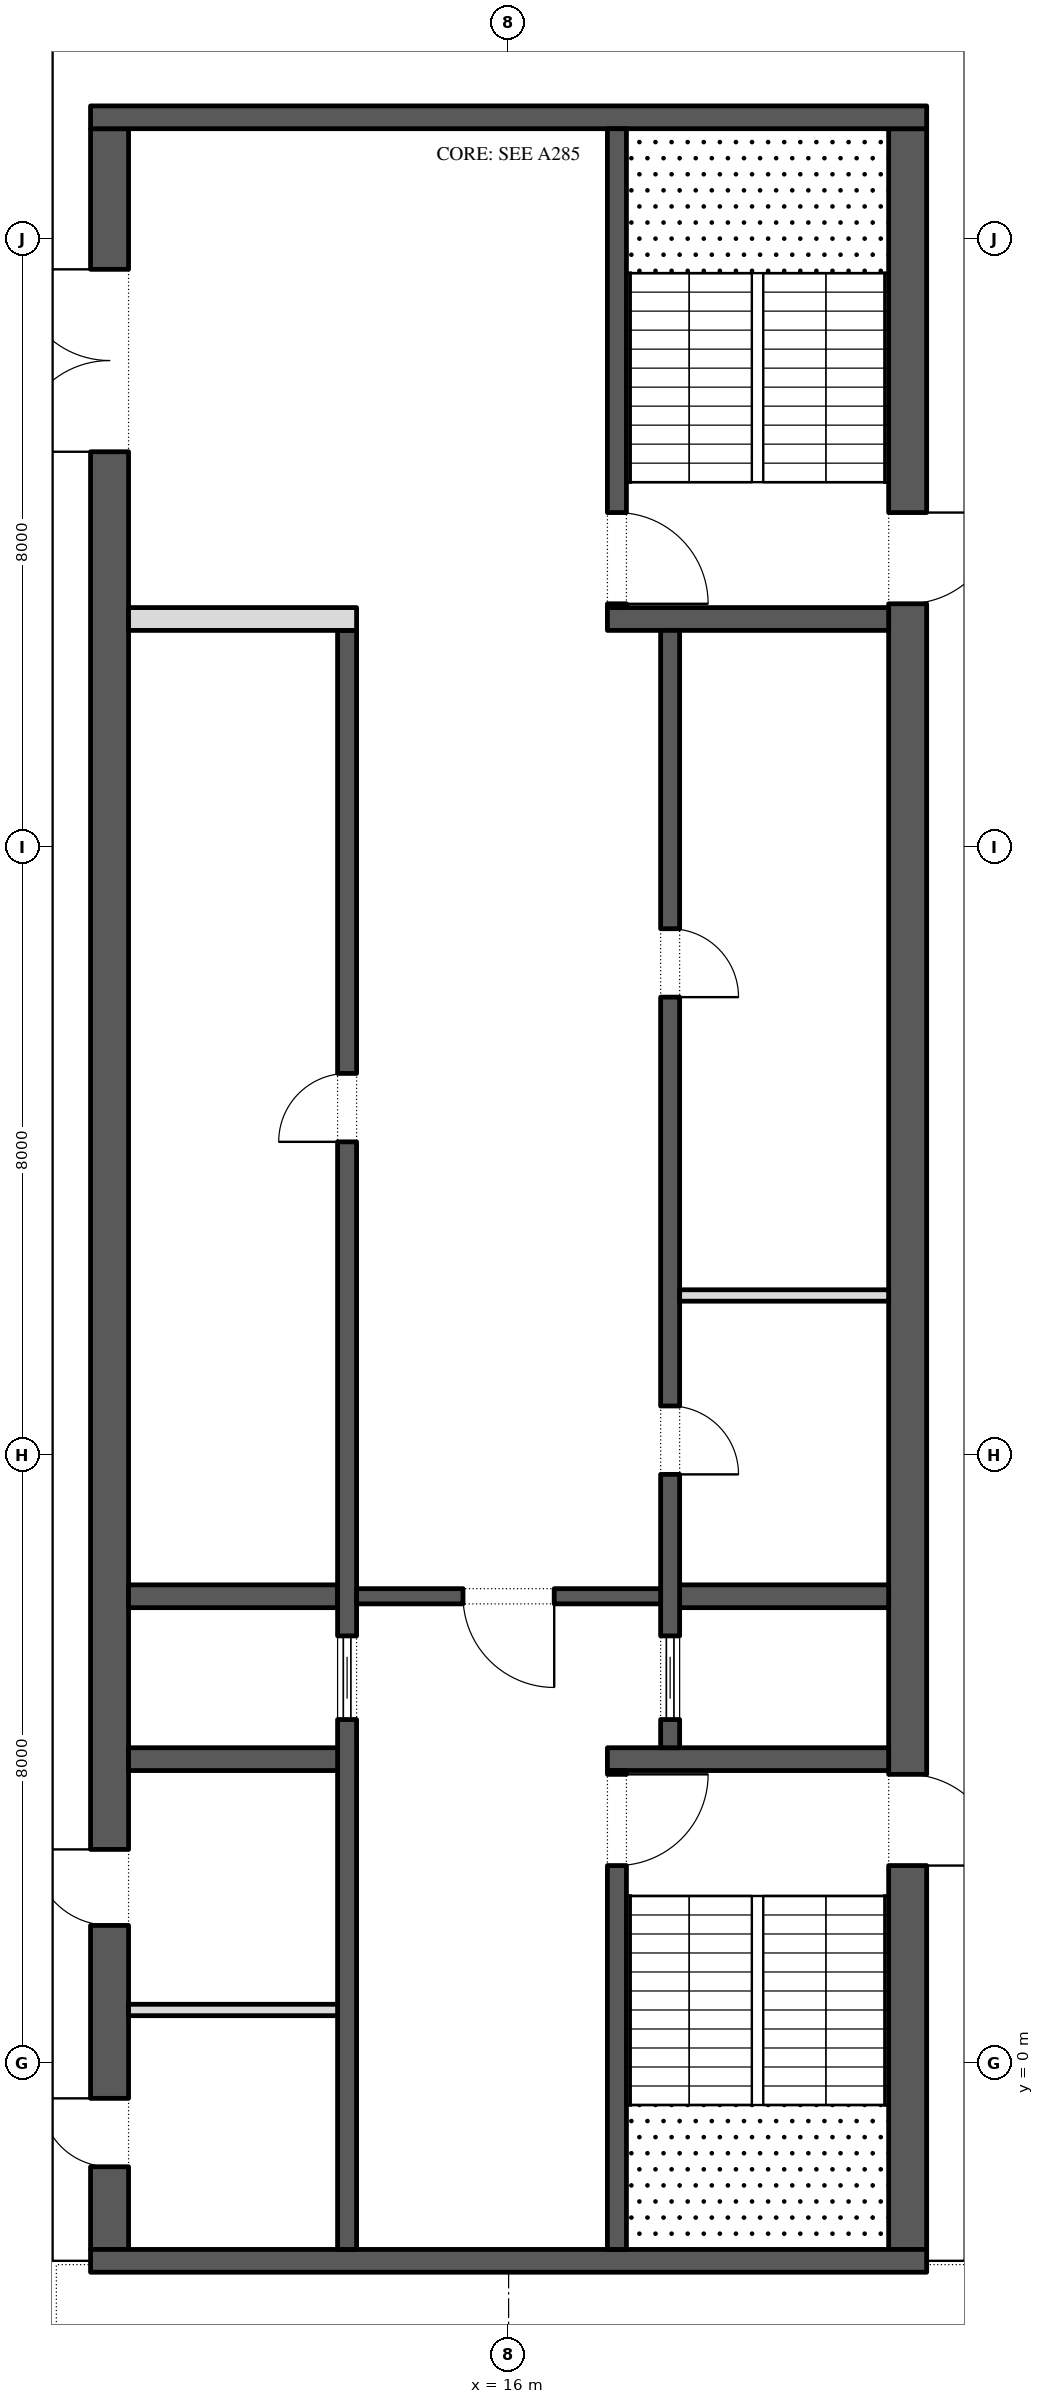
"""IFC4 building model, lengths in metres.
Left out: names, types, materials, properties, quantities, classifications, styles, units other than length and angle.
Written with IfcOpenShell. Run it as: python <this file> out.ifc"""

import sys

from ifc_helpers import new_model, si_unit, direction, frame, frame_2d, origin, place, context, subcontext, project, spatial, rectangle, extrude, element, fill, save


model = new_model("IFC4")
c1 = context("Model", 3, precision=1e-05, world=origin(), true_north=direction((0.0, 1.0)))
c2 = subcontext(c1, "Body", "Model", "MODEL_VIEW")
j1 = project(units=[si_unit("LENGTHUNIT", "METRE"), si_unit("PLANEANGLEUNIT", "RADIAN")], contexts=[c1])
p1 = place(None, origin())
s1 = spatial("IfcSite", under=j1, at=p1, CompositionType="ELEMENT")
p2 = place(p1, origin())
s2 = spatial("IfcBuilding", under=s1, at=p2, CompositionType="ELEMENT")
p3 = place(p2, frame((0.0, 0.0, 373.2)))
s3 = spatial("IfcBuildingStorey", under=s2, at=p3, CompositionType="ELEMENT", Elevation=373.2)
p4 = place(p3, frame((21.25, -2.45, 0.0), z_axis=(0.0, 0.0, 1.0), x_axis=(0.0, 1.0, 0.0)))
e1 = element("IfcWall", 1, at=p4, inside=s3, PredefinedType="SHEAR", context=c2, shape_type="SweptSolid", body=[
    extrude(rectangle(XDim=27.9, YDim=0.5, at=frame_2d((13.95, 0.0))), origin(), (0.0, 0.0, 1.0), 4.0),
])
p5 = place(p4, frame((5.05, 0.0, 0.0)))
e2 = element("IfcOpeningElement", 2, at=p5, cuts=e1, PredefinedType="OPENING", context=c2, shape_type="SweptSolid", body=[
    extrude(rectangle(XDim=1.2, YDim=2.1, at=frame_2d((0.6, 1.05))), frame((0.0, 0.26, 0.0), z_axis=(0.0, -1.0, 0.0), x_axis=(1.0, 0.0, 0.0)), (0.0, 0.0, 1.0), 0.52),
])
p6 = place(p4, frame((21.65, 0.0, 0.0)))
e3 = element("IfcOpeningElement", 3, at=p6, cuts=e1, PredefinedType="OPENING", context=c2, shape_type="SweptSolid", body=[
    extrude(rectangle(XDim=1.2, YDim=2.1, at=frame_2d((0.6, 1.05))), frame((0.0, 0.26, 0.0), z_axis=(0.0, -1.0, 0.0), x_axis=(1.0, 0.0, 0.0)), (0.0, 0.0, 1.0), 0.52),
])
p7 = place(p3, frame((10.75, -2.45, 0.0), z_axis=(0.0, 0.0, 1.0), x_axis=(0.0, 1.0, 0.0)))
e4 = element("IfcWall", 4, at=p7, inside=s3, PredefinedType="SHEAR", context=c2, shape_type="SweptSolid", body=[
    extrude(rectangle(XDim=27.9, YDim=0.5, at=frame_2d((13.95, 0.0))), origin(), (0.0, 0.0, 1.0), 4.0),
])
p8 = place(p7, frame((23.65, 0.0, 0.0)))
e5 = element("IfcOpeningElement", 5, at=p8, cuts=e4, PredefinedType="OPENING", context=c2, shape_type="SweptSolid", body=[
    extrude(rectangle(XDim=2.4, YDim=2.1, at=frame_2d((1.2, 1.05))), frame((0.0, 0.26, 0.0), z_axis=(0.0, -1.0, 0.0), x_axis=(1.0, 0.0, 0.0)), (0.0, 0.0, 1.0), 0.52),
])
p9 = place(p7, frame((1.087, 0.0, 0.0)))
e6 = element("IfcOpeningElement", 6, at=p9, cuts=e4, PredefinedType="OPENING", context=c2, shape_type="SweptSolid", body=[
    extrude(rectangle(XDim=0.9, YDim=2.1, at=frame_2d((0.45, 1.05))), frame((0.0, 0.26, 0.0), z_axis=(0.0, -1.0, 0.0), x_axis=(1.0, 0.0, 0.0)), (0.0, 0.0, 1.0), 0.52),
])
p10 = place(p7, frame((4.262, 0.0, 0.0)))
e7 = element("IfcOpeningElement", 7, at=p10, cuts=e4, PredefinedType="OPENING", context=c2, shape_type="SweptSolid", body=[
    extrude(rectangle(XDim=1.0, YDim=2.1, at=frame_2d((0.5, 1.05))), frame((0.0, 0.26, 0.0), z_axis=(0.0, -1.0, 0.0), x_axis=(1.0, 0.0, 0.0)), (0.0, 0.0, 1.0), 0.52),
])
for number, where, z_axis, x_axis in (
    (8, (10.5, -2.6, 0.0), (0.0, 0.0, 1.0), (1.0, 0.0, 0.0)),
    (9, (10.5, 25.6, 0.0), (0.0, 0.0, 1.0), (1.0, 0.0, 0.0)),
):
    element("IfcWall", number, at=place(p3, frame(where, z_axis=z_axis, x_axis=x_axis)), inside=s3, PredefinedType="SHEAR", context=c2, shape_type="SweptSolid", body=[
        extrude(rectangle(XDim=11.0, YDim=0.3, at=frame_2d((5.5, 0.0))), origin(), (0.0, 0.0, 1.0), 4.0),
    ])
p11 = place(p3, frame((17.3, 4.0, 0.0), z_axis=(0.0, 0.0, 1.0), x_axis=(1.0, 0.0, 0.0)))
e10 = element("IfcWall", 10, at=p11, inside=s3, PredefinedType="SHEAR", context=c2, shape_type="SweptSolid", body=[
    extrude(rectangle(XDim=3.7, YDim=0.3, at=frame_2d((1.85, 0.0))), origin(), (0.0, 0.0, 1.0), 4.0),
])
p12 = place(p3, frame((17.425, -2.45, 0.0), z_axis=(0.0, 0.0, 1.0), x_axis=(0.0, 1.0, 0.0)))
e11 = element("IfcWall", 11, at=p12, inside=s3, PredefinedType="SHEAR", context=c2, shape_type="SweptSolid", body=[
    extrude(rectangle(XDim=6.3, YDim=0.25, at=frame_2d((3.15, 0.0))), origin(), (0.0, 0.0, 1.0), 4.0),
])
p13 = place(p12, frame((5.05, 0.0, 0.0)))
e12 = element("IfcOpeningElement", 12, at=p13, cuts=e11, PredefinedType="OPENING", context=c2, shape_type="SweptSolid", body=[
    extrude(rectangle(XDim=1.2, YDim=2.1, at=frame_2d((0.6, 1.05))), frame((0.0, 0.135, 0.0), z_axis=(0.0, -1.0, 0.0), x_axis=(1.0, 0.0, 0.0)), (0.0, 0.0, 1.0), 0.27),
])
p14 = place(p3, frame((17.3, 19.0, 0.0), z_axis=(0.0, 0.0, 1.0), x_axis=(1.0, 0.0, 0.0)))
e13 = element("IfcWall", 13, at=p14, inside=s3, PredefinedType="SHEAR", context=c2, shape_type="SweptSolid", body=[
    extrude(rectangle(XDim=3.7, YDim=0.3, at=frame_2d((1.85, 0.0))), origin(), (0.0, 0.0, 1.0), 4.0),
])
p15 = place(p3, frame((17.425, 19.15, 0.0), z_axis=(0.0, 0.0, 1.0), x_axis=(0.0, 1.0, 0.0)))
e14 = element("IfcWall", 14, at=p15, inside=s3, PredefinedType="SHEAR", context=c2, shape_type="SweptSolid", body=[
    extrude(rectangle(XDim=6.3, YDim=0.25, at=frame_2d((3.15, 0.0))), origin(), (0.0, 0.0, 1.0), 4.0),
])
p16 = place(p15, frame((0.05, 0.0, 0.0)))
e15 = element("IfcOpeningElement", 15, at=p16, cuts=e14, PredefinedType="OPENING", context=c2, shape_type="SweptSolid", body=[
    extrude(rectangle(XDim=1.2, YDim=2.1, at=frame_2d((0.6, 1.05))), frame((0.0, 0.135, 0.0), z_axis=(0.0, -1.0, 0.0), x_axis=(1.0, 0.0, 0.0)), (0.0, 0.0, 1.0), 0.27),
])
p17 = place(p3, frame((18.25, 6.143, 0.0), z_axis=(0.0, 0.0, 1.0), x_axis=(1.0, 0.0, 0.0)))
e16 = element("IfcWall", 16, at=p17, inside=s3, PredefinedType="SHEAR", context=c2, shape_type="SweptSolid", body=[
    extrude(rectangle(XDim=2.75, YDim=0.3, at=frame_2d((1.375, 0.0))), origin(), (0.0, 0.0, 1.0), 4.0),
])
p18 = place(p3, frame((18.125, 4.15, 0.0), z_axis=(0.0, 0.0, 1.0), x_axis=(0.0, 1.0, 0.0)))
e17 = element("IfcWall", 17, at=p18, inside=s3, PredefinedType="SHEAR", context=c2, shape_type="SweptSolid", body=[
    extrude(rectangle(XDim=14.7, YDim=0.25, at=frame_2d((7.35, 0.0))), origin(), (0.0, 0.0, 1.0), 4.0),
])
p19 = place(p18, frame((3.596, 0.0, 0.0)))
e18 = element("IfcOpeningElement", 18, at=p19, cuts=e17, PredefinedType="OPENING", context=c2, shape_type="SweptSolid", body=[
    extrude(rectangle(XDim=0.9, YDim=2.1, at=frame_2d((0.45, 1.05))), frame((0.0, 0.135, 0.0), z_axis=(0.0, -1.0, 0.0), x_axis=(1.0, 0.0, 0.0)), (0.0, 0.0, 1.0), 0.27),
])
p20 = place(p18, frame((9.875, 0.0, 0.0)))
e19 = element("IfcOpeningElement", 19, at=p20, cuts=e17, PredefinedType="OPENING", context=c2, shape_type="SweptSolid", body=[
    extrude(rectangle(XDim=0.9, YDim=2.1, at=frame_2d((0.45, 1.05))), frame((0.0, 0.135, 0.0), z_axis=(0.0, -1.0, 0.0), x_axis=(1.0, 0.0, 0.0)), (0.0, 0.0, 1.0), 0.27),
])
p21 = place(p18, frame((0.371, 0.0, 0.0)))
e20 = element("IfcOpeningElement", 20, at=p21, cuts=e17, PredefinedType="OPENING", context=c2, shape_type="SweptSolid", body=[
    extrude(rectangle(XDim=1.1, YDim=2.1, at=frame_2d((0.55, 1.05))), frame((0.0, 0.135, 0.0), z_axis=(0.0, -1.0, 0.0), x_axis=(1.0, 0.0, 0.0)), (0.0, 0.0, 1.0), 0.27),
])
p22 = place(p3, frame((18.25, 10.1, 0.0), z_axis=(0.0, 0.0, 1.0), x_axis=(1.0, 0.0, 0.0)))
e21 = element("IfcWall", 21, at=p22, inside=s3, PredefinedType="PARTITIONING", context=c2, shape_type="SweptSolid", body=[
    extrude(rectangle(XDim=2.75, YDim=0.15, at=frame_2d((1.375, 0.0))), origin(), (0.0, 0.0, 1.0), 4.0),
])
p23 = place(p3, frame((11.0, 4.0, 0.0), z_axis=(0.0, 0.0, 1.0), x_axis=(1.0, 0.0, 0.0)))
e22 = element("IfcWall", 22, at=p23, inside=s3, PredefinedType="SHEAR", context=c2, shape_type="SweptSolid", body=[
    extrude(rectangle(XDim=3.0, YDim=0.3, at=frame_2d((1.5, 0.0))), origin(), (0.0, 0.0, 1.0), 4.0),
])
p24 = place(p3, frame((11.0, 6.143, 0.0), z_axis=(0.0, 0.0, 1.0), x_axis=(1.0, 0.0, 0.0)))
e23 = element("IfcWall", 23, at=p24, inside=s3, PredefinedType="SHEAR", context=c2, shape_type="SweptSolid", body=[
    extrude(rectangle(XDim=2.75, YDim=0.3, at=frame_2d((1.375, 0.0))), origin(), (0.0, 0.0, 1.0), 4.0),
])
p25 = place(p3, frame((13.875, -2.45, 0.0), z_axis=(0.0, 0.0, 1.0), x_axis=(0.0, 1.0, 0.0)))
e24 = element("IfcWall", 24, at=p25, inside=s3, PredefinedType="SHEAR", context=c2, shape_type="SweptSolid", body=[
    extrude(rectangle(XDim=21.3, YDim=0.25, at=frame_2d((10.65, 0.0))), origin(), (0.0, 0.0, 1.0), 4.0),
])
p26 = place(p25, frame((14.571, 0.0, 0.0)))
e25 = element("IfcOpeningElement", 25, at=p26, cuts=e24, PredefinedType="OPENING", context=c2, shape_type="SweptSolid", body=[
    extrude(rectangle(XDim=0.9, YDim=2.1, at=frame_2d((0.45, 1.05))), frame((0.0, 0.135, 0.0), z_axis=(0.0, -1.0, 0.0), x_axis=(1.0, 0.0, 0.0)), (0.0, 0.0, 1.0), 0.27),
])
p27 = place(p25, frame((6.971, 0.0, 0.0)))
e26 = element("IfcOpeningElement", 26, at=p27, cuts=e24, PredefinedType="OPENING", context=c2, shape_type="SweptSolid", body=[
    extrude(rectangle(XDim=1.1, YDim=2.1, at=frame_2d((0.55, 1.05))), frame((0.0, 0.135, 0.0), z_axis=(0.0, -1.0, 0.0), x_axis=(1.0, 0.0, 0.0)), (0.0, 0.0, 1.0), 0.27),
])
p28 = place(p3, frame((11.0, 19.0, 0.0), z_axis=(0.0, 0.0, 1.0), x_axis=(1.0, 0.0, 0.0)))
e27 = element("IfcWall", 27, at=p28, inside=s3, PredefinedType="PARTITIONING", context=c2, shape_type="SweptSolid", body=[
    extrude(rectangle(XDim=3.0, YDim=0.3, at=frame_2d((1.5, 0.0))), origin(), (0.0, 0.0, 1.0), 4.0),
])
p29 = place(p3, frame((14.0, 6.143, 0.0), z_axis=(0.0, 0.0, 1.0), x_axis=(1.0, 0.0, 0.0)))
e28 = element("IfcWall", 28, at=p29, inside=s3, PredefinedType="SHEAR", context=c2, shape_type="SweptSolid", body=[
    extrude(rectangle(XDim=4.0, YDim=0.2, at=frame_2d((2.0, 0.0))), origin(), (0.0, 0.0, 1.0), 4.0),
])
p30 = place(p29, frame((1.4, 0.0, 0.0)))
e29 = element("IfcOpeningElement", 29, at=p30, cuts=e28, PredefinedType="OPENING", context=c2, shape_type="SweptSolid", body=[
    extrude(rectangle(XDim=1.2, YDim=2.1, at=frame_2d((0.6, 1.05))), frame((0.0, 0.11, 0.0), z_axis=(0.0, -1.0, 0.0), x_axis=(1.0, 0.0, 0.0)), (0.0, 0.0, 1.0), 0.22),
])
p31 = place(p3, frame((11.0, 0.7, 0.0), z_axis=(0.0, 0.0, 1.0), x_axis=(1.0, 0.0, 0.0)))
e30 = element("IfcWall", 30, at=p31, inside=s3, PredefinedType="PARTITIONING", context=c2, shape_type="SweptSolid", body=[
    extrude(rectangle(XDim=2.75, YDim=0.15, at=frame_2d((1.375, 0.0))), origin(), (0.0, 0.0, 1.0), 4.0),
])
p32 = place(p19, frame((0.9, -0.2, 0.0), z_axis=(0.0, 0.0, 1.0), x_axis=(-1.0, 0.0, 0.0)))
e31 = element("IfcDoor", 31, at=p32, inside=s3, OperationType="SINGLE_SWING_LEFT", PredefinedType="DOOR", context=c2, shape_type="SweptSolid", body=[
    extrude(rectangle(XDim=0.9, YDim=2.1, at=frame_2d((0.45, 1.05))), frame((0.0, -0.075, 0.0), z_axis=(0.0, -1.0, 0.0), x_axis=(1.0, 0.0, 0.0)), (0.0, 0.0, 1.0), 0.05),
])
fill(e18, e31)
p33 = place(p20, frame((0.9, -0.2, 0.0), z_axis=(0.0, 0.0, 1.0), x_axis=(-1.0, 0.0, 0.0)))
e32 = element("IfcDoor", 32, at=p33, inside=s3, OperationType="SINGLE_SWING_LEFT", PredefinedType="DOOR", context=c2, shape_type="SweptSolid", body=[
    extrude(rectangle(XDim=0.9, YDim=2.1, at=frame_2d((0.45, 1.05))), frame((0.0, -0.075, 0.0), z_axis=(0.0, -1.0, 0.0), x_axis=(1.0, 0.0, 0.0)), (0.0, 0.0, 1.0), 0.05),
])
fill(e19, e32)
p34 = place(p21, origin())
e33 = element("IfcDoor", 33, at=p34, inside=s3, OperationType="SLIDING_TO_LEFT", PredefinedType="DOOR", context=c2, shape_type="SweptSolid", body=[
    extrude(rectangle(XDim=1.1, YDim=2.1, at=frame_2d((0.55, 1.05))), frame((0.0, 0.025, 0.0), z_axis=(0.0, -1.0, 0.0), x_axis=(1.0, 0.0, 0.0)), (0.0, 0.0, 1.0), 0.05),
])
fill(e20, e33)
p35 = place(p26, origin())
e34 = element("IfcDoor", 34, at=p35, inside=s3, OperationType="SINGLE_SWING_RIGHT", PredefinedType="DOOR", context=c2, shape_type="SweptSolid", body=[
    extrude(rectangle(XDim=0.9, YDim=2.1, at=frame_2d((0.45, 1.05))), frame((0.0, 0.125, 0.0), z_axis=(0.0, -1.0, 0.0), x_axis=(1.0, 0.0, 0.0)), (0.0, 0.0, 1.0), 0.05),
])
fill(e25, e34)
p36 = place(p27, origin())
e35 = element("IfcDoor", 35, at=p36, inside=s3, OperationType="SLIDING_TO_LEFT", PredefinedType="DOOR", context=c2, shape_type="SweptSolid", body=[
    extrude(rectangle(XDim=1.1, YDim=2.1, at=frame_2d((0.55, 1.05))), frame((0.0, 0.025, 0.0), z_axis=(0.0, -1.0, 0.0), x_axis=(1.0, 0.0, 0.0)), (0.0, 0.0, 1.0), 0.05),
])
fill(e26, e35)
p37 = place(p30, frame((1.2, 0.0, 0.0), z_axis=(0.0, 0.0, 1.0), x_axis=(-1.0, 0.0, 0.0)))
e36 = element("IfcDoor", 36, at=p37, inside=s3, OperationType="SINGLE_SWING_RIGHT", PredefinedType="DOOR", context=c2, shape_type="SweptSolid", body=[
    extrude(rectangle(XDim=1.2, YDim=2.1, at=frame_2d((0.6, 1.05))), frame((0.0, 0.025, 0.0), z_axis=(0.0, -1.0, 0.0), x_axis=(1.0, 0.0, 0.0)), (0.0, 0.0, 1.0), 0.05),
])
fill(e29, e36)
p38 = place(p8, origin())
e37 = element("IfcDoor", 37, at=p38, inside=s3, OperationType="DOUBLE_DOOR_SINGLE_SWING", PredefinedType="DOOR", context=c2, shape_type="SweptSolid", body=[
    extrude(rectangle(XDim=2.4, YDim=2.1, at=frame_2d((1.2, 1.05))), frame((0.0, 0.025, 0.0), z_axis=(0.0, -1.0, 0.0), x_axis=(1.0, 0.0, 0.0)), (0.0, 0.0, 1.0), 0.05),
])
fill(e5, e37)
p39 = place(p13, frame((1.2, 0.0, 0.0), z_axis=(0.0, 0.0, 1.0), x_axis=(-1.0, 0.0, 0.0)))
e38 = element("IfcDoor", 38, at=p39, inside=s3, OperationType="SINGLE_SWING_RIGHT", PredefinedType="DOOR", context=c2, shape_type="SweptSolid", body=[
    extrude(rectangle(XDim=1.2, YDim=2.1, at=frame_2d((0.6, 1.05))), frame((0.0, 0.025, 0.0), z_axis=(0.0, -1.0, 0.0), x_axis=(1.0, 0.0, 0.0)), (0.0, 0.0, 1.0), 0.05),
])
fill(e12, e38)
p40 = place(p5, frame((1.2, 0.0, 0.0), z_axis=(0.0, 0.0, 1.0), x_axis=(-1.0, 0.0, 0.0)))
e39 = element("IfcDoor", 39, at=p40, inside=s3, OperationType="SINGLE_SWING_LEFT", PredefinedType="DOOR", context=c2, shape_type="SweptSolid", body=[
    extrude(rectangle(XDim=1.2, YDim=2.1, at=frame_2d((0.6, 1.05))), frame((0.0, 0.025, 0.0), z_axis=(0.0, -1.0, 0.0), x_axis=(1.0, 0.0, 0.0)), (0.0, 0.0, 1.0), 0.05),
])
fill(e2, e39)
p41 = place(p16, frame((1.2, 0.0, 0.0), z_axis=(0.0, 0.0, 1.0), x_axis=(-1.0, 0.0, 0.0)))
e40 = element("IfcDoor", 40, at=p41, inside=s3, OperationType="SINGLE_SWING_LEFT", PredefinedType="DOOR", context=c2, shape_type="SweptSolid", body=[
    extrude(rectangle(XDim=1.2, YDim=2.1, at=frame_2d((0.6, 1.05))), frame((0.0, 0.025, 0.0), z_axis=(0.0, -1.0, 0.0), x_axis=(1.0, 0.0, 0.0)), (0.0, 0.0, 1.0), 0.05),
])
fill(e15, e40)
p42 = place(p6, frame((1.2, 0.0, 0.0), z_axis=(0.0, 0.0, 1.0), x_axis=(-1.0, 0.0, 0.0)))
e41 = element("IfcDoor", 41, at=p42, inside=s3, OperationType="SINGLE_SWING_RIGHT", PredefinedType="DOOR", context=c2, shape_type="SweptSolid", body=[
    extrude(rectangle(XDim=1.2, YDim=2.1, at=frame_2d((0.6, 1.05))), frame((0.0, 0.025, 0.0), z_axis=(0.0, -1.0, 0.0), x_axis=(1.0, 0.0, 0.0)), (0.0, 0.0, 1.0), 0.05),
])
fill(e3, e41)
p43 = place(p9, origin())
e42 = element("IfcDoor", 42, at=p43, inside=s3, OperationType="SINGLE_SWING_LEFT", PredefinedType="DOOR", context=c2, shape_type="SweptSolid", body=[
    extrude(rectangle(XDim=0.9, YDim=2.1, at=frame_2d((0.45, 1.05))), frame((0.0, -0.2, 0.0), z_axis=(0.0, -1.0, 0.0), x_axis=(1.0, 0.0, 0.0)), (0.0, 0.0, 1.0), 0.05),
])
fill(e6, e42)
p44 = place(p10, origin())
e43 = element("IfcDoor", 43, at=p44, inside=s3, OperationType="SINGLE_SWING_LEFT", PredefinedType="DOOR", context=c2, shape_type="SweptSolid", body=[
    extrude(rectangle(XDim=1.0, YDim=2.1, at=frame_2d((0.5, 1.05))), frame((0.0, -0.2, 0.0), z_axis=(0.0, -1.0, 0.0), x_axis=(1.0, 0.0, 0.0)), (0.0, 0.0, 1.0), 0.05),
])
fill(e7, e43)
save(model, sys.argv[1])
